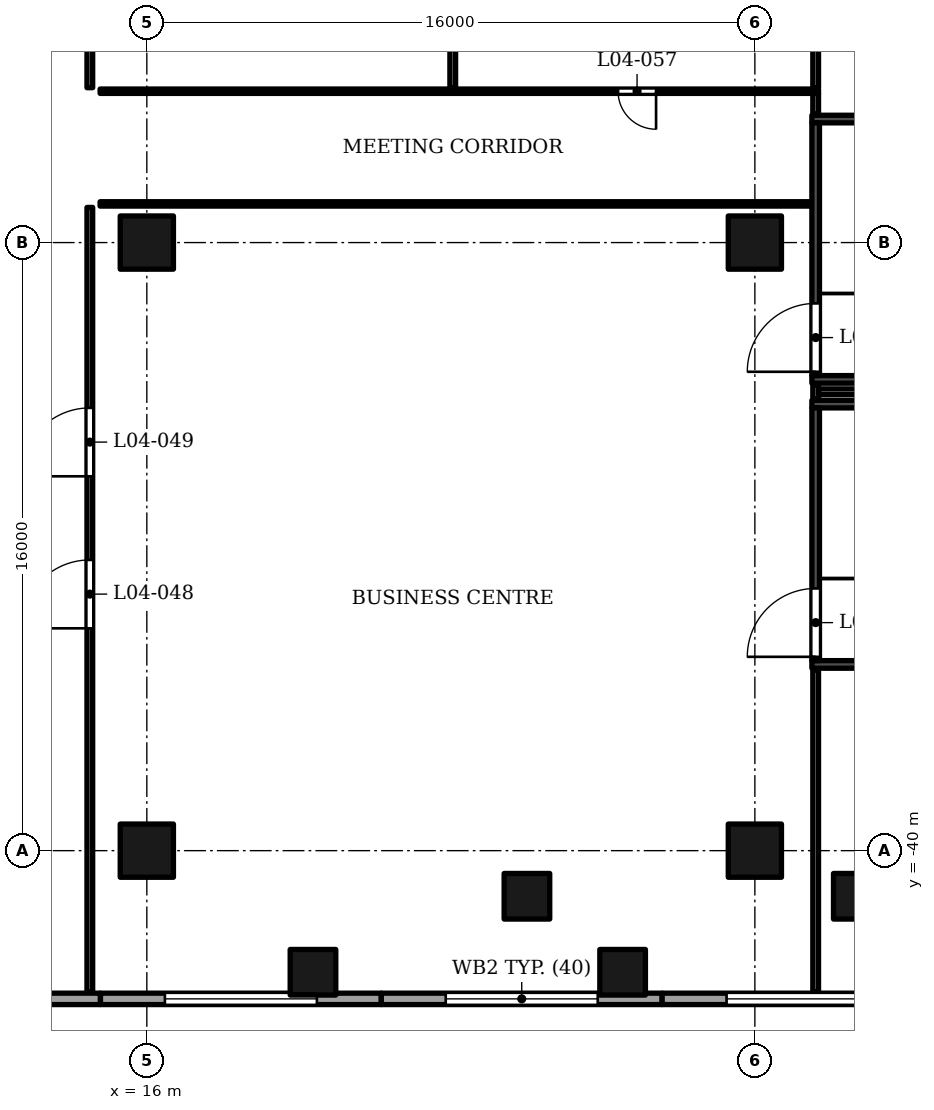
"""IFC4 building model, lengths in metres.
Left out: names, types, materials, properties, quantities, classifications, styles, units other than length and angle.
Written with IfcOpenShell. Run it as: python <this file> out.ifc"""

import sys

from ifc_helpers import new_model, si_unit, direction, frame, frame_2d, origin, origin_2d, place, context, subcontext, project, spatial, rectangle, extrude, element, fill, save


model = new_model("IFC4")
c1 = context("Model", 3, precision=1e-05, world=origin(), true_north=direction((0.0, 1.0)))
c2 = subcontext(c1, "Body", "Model", "MODEL_VIEW")
j1 = project(units=[si_unit("LENGTHUNIT", "METRE"), si_unit("PLANEANGLEUNIT", "RADIAN")], contexts=[c1])
p1 = place(None, origin())
s1 = spatial("IfcSite", under=j1, at=p1, CompositionType="ELEMENT")
p2 = place(p1, origin())
s2 = spatial("IfcBuilding", under=s1, at=p2, CompositionType="ELEMENT")
p3 = place(p2, frame((0.0, 0.0, 34.5)))
s3 = spatial("IfcBuildingStorey", under=s2, at=p3, CompositionType="ELEMENT", Elevation=34.5)
for number, where, z_axis, x_axis in (
    (1, (16.0, -40.0, 0.0), (0.0, 0.0, 1.0), (1.0, 0.0, 0.0)),
    (2, (16.0, -24.0, 0.0), (0.0, 0.0, 1.0), (1.0, 0.0, 0.0)),
    (3, (32.0, -40.0, 0.0), (0.0, 0.0, 1.0), (1.0, 0.0, 0.0)),
    (4, (32.0, -24.0, 0.0), (0.0, 0.0, 1.0), (1.0, 0.0, 0.0)),
):
    element("IfcColumn", number, at=place(p3, frame(where, z_axis=z_axis, x_axis=x_axis)), inside=s3, PredefinedType="COLUMN", context=c2, shape_type="SweptSolid", body=[
        extrude(rectangle(XDim=1.4, YDim=1.4, at=origin_2d()), origin(), (0.0, 0.0, 1.0), 5.5),
    ])
for number, where, z_axis, x_axis in (
    (5, (34.669, -41.2, 0.0), (0.0, 0.0, 1.0), (1.0, 0.0, 0.0)),
    (6, (26.002, -41.2, 0.0), (0.0, 0.0, 1.0), (1.0, 0.0, 0.0)),
    (7, (28.52, -43.2, 0.0), (0.0, 0.0, 1.0), (1.0, 0.0, 0.0)),
    (8, (20.372, -43.2, 0.0), (0.0, 0.0, 1.0), (1.0, 0.0, 0.0)),
):
    element("IfcColumn", number, at=place(p3, frame(where, z_axis=z_axis, x_axis=x_axis)), inside=s3, PredefinedType="COLUMN", context=c2, shape_type="SweptSolid", body=[
        extrude(rectangle(XDim=1.2, YDim=1.2, at=origin_2d()), origin(), (0.0, 0.0, 1.0), 5.5),
    ])
p4 = place(p3, frame((7.39, -43.9, 0.0), z_axis=(0.0, 0.0, 1.0), x_axis=(1.0, 0.0, 0.0)))
e9 = element("IfcWall", 9, at=p4, inside=s3, PredefinedType="SOLIDWALL", context=c2, shape_type="SweptSolid", body=[
    extrude(rectangle(XDim=7.39, YDim=0.3, at=frame_2d((3.695, 0.0))), origin(), (0.0, 0.0, 1.0), 4.1),
])
p5 = place(p4, frame((1.695, 0.0, 1.0)))
e10 = element("IfcOpeningElement", 10, at=p5, cuts=e9, PredefinedType="OPENING", context=c2, shape_type="SweptSolid", body=[
    extrude(rectangle(XDim=4.0, YDim=1.8, at=frame_2d((2.0, 0.9))), frame((0.0, 0.16, 0.0), z_axis=(0.0, -1.0, 0.0), x_axis=(1.0, 0.0, 0.0)), (0.0, 0.0, 1.0), 0.32),
])
p6 = place(p3, frame((14.78, -43.9, 0.0), z_axis=(0.0, 0.0, 1.0), x_axis=(1.0, 0.0, 0.0)))
e11 = element("IfcWall", 11, at=p6, inside=s3, PredefinedType="SOLIDWALL", context=c2, shape_type="SweptSolid", body=[
    extrude(rectangle(XDim=7.39, YDim=0.3, at=frame_2d((3.695, 0.0))), origin(), (0.0, 0.0, 1.0), 4.1),
])
p7 = place(p6, frame((1.695, 0.0, 1.0)))
e12 = element("IfcOpeningElement", 12, at=p7, cuts=e11, PredefinedType="OPENING", context=c2, shape_type="SweptSolid", body=[
    extrude(rectangle(XDim=4.0, YDim=1.8, at=frame_2d((2.0, 0.9))), frame((0.0, 0.16, 0.0), z_axis=(0.0, -1.0, 0.0), x_axis=(1.0, 0.0, 0.0)), (0.0, 0.0, 1.0), 0.32),
])
p8 = place(p3, frame((22.17, -43.9, 0.0), z_axis=(0.0, 0.0, 1.0), x_axis=(1.0, 0.0, 0.0)))
e13 = element("IfcWall", 13, at=p8, inside=s3, PredefinedType="SOLIDWALL", context=c2, shape_type="SweptSolid", body=[
    extrude(rectangle(XDim=7.39, YDim=0.3, at=frame_2d((3.695, 0.0))), origin(), (0.0, 0.0, 1.0), 4.1),
])
p9 = place(p8, frame((1.695, 0.0, 1.0)))
e14 = element("IfcOpeningElement", 14, at=p9, cuts=e13, PredefinedType="OPENING", context=c2, shape_type="SweptSolid", body=[
    extrude(rectangle(XDim=4.0, YDim=1.8, at=frame_2d((2.0, 0.9))), frame((0.0, 0.16, 0.0), z_axis=(0.0, -1.0, 0.0), x_axis=(1.0, 0.0, 0.0)), (0.0, 0.0, 1.0), 0.32),
])
p10 = place(p3, frame((29.56, -43.9, 0.0), z_axis=(0.0, 0.0, 1.0), x_axis=(1.0, 0.0, 0.0)))
e15 = element("IfcWall", 15, at=p10, inside=s3, PredefinedType="SOLIDWALL", context=c2, shape_type="SweptSolid", body=[
    extrude(rectangle(XDim=7.39, YDim=0.3, at=frame_2d((3.695, 0.0))), origin(), (0.0, 0.0, 1.0), 4.1),
])
p11 = place(p10, frame((1.695, 0.0, 1.0)))
e16 = element("IfcOpeningElement", 16, at=p11, cuts=e15, PredefinedType="OPENING", context=c2, shape_type="SweptSolid", body=[
    extrude(rectangle(XDim=4.0, YDim=1.8, at=frame_2d((2.0, 0.9))), frame((0.0, 0.16, 0.0), z_axis=(0.0, -1.0, 0.0), x_axis=(1.0, 0.0, 0.0)), (0.0, 0.0, 1.0), 0.32),
])
for number, where, z_axis, x_axis in (
    (17, (7.4, -43.85, 5.5), (0.0, 0.0, 1.0), (1.0, 0.0, 0.0)),
    (18, (22.2, -43.85, 5.5), (0.0, 0.0, 1.0), (1.0, 0.0, 0.0)),
):
    element("IfcWall", number, at=place(p3, frame(where, z_axis=z_axis, x_axis=x_axis)), inside=s3, PredefinedType="PARAPET", context=c2, shape_type="SweptSolid", body=[
        extrude(rectangle(XDim=14.8, YDim=0.3, at=frame_2d((7.4, 0.0))), origin(), (0.0, 0.0, 1.0), 1.1),
    ])
for number, where, z_axis, x_axis in (
    (19, (33.5, -35.1, 0.0), (0.0, 0.0, 1.0), (1.0, 0.0, 0.0)),
    (20, (33.5, -28.25, 0.0), (0.0, 0.0, 1.0), (1.0, 0.0, 0.0)),
):
    element("IfcWall", number, at=place(p3, frame(where, z_axis=z_axis, x_axis=x_axis)), inside=s3, PredefinedType="SOLIDWALL", context=c2, shape_type="SweptSolid", body=[
        extrude(rectangle(XDim=4.87, YDim=0.2, at=frame_2d((2.435, 0.0))), origin(), (0.0, 0.0, 1.0), 5.05),
    ])
p12 = place(p3, frame((33.6, -35.0, 0.0), z_axis=(0.0, 0.0, 1.0), x_axis=(0.0, 1.0, 0.0)))
e21 = element("IfcWall", 21, at=p12, inside=s3, PredefinedType="SOLIDWALL", context=c2, shape_type="SweptSolid", body=[
    extrude(rectangle(XDim=6.65, YDim=0.2, at=frame_2d((3.325, 0.0))), origin(), (0.0, 0.0, 1.0), 5.05),
])
p13 = place(p12, frame((0.1, 0.0, 0.0)))
e22 = element("IfcOpeningElement", 22, at=p13, cuts=e21, PredefinedType="OPENING", context=c2, shape_type="SweptSolid", body=[
    extrude(rectangle(XDim=1.8, YDim=2.4, at=frame_2d((0.9, 1.2))), frame((0.0, 0.11, 0.0), z_axis=(0.0, -1.0, 0.0), x_axis=(1.0, 0.0, 0.0)), (0.0, 0.0, 1.0), 0.22),
])
for number, where, z_axis, x_axis in (
    (23, (33.5, -27.6, 0.0), (0.0, 0.0, 1.0), (1.0, 0.0, 0.0)),
    (24, (33.5, -20.75, 0.0), (0.0, 0.0, 1.0), (1.0, 0.0, 0.0)),
):
    element("IfcWall", number, at=place(p3, frame(where, z_axis=z_axis, x_axis=x_axis)), inside=s3, PredefinedType="SOLIDWALL", context=c2, shape_type="SweptSolid", body=[
        extrude(rectangle(XDim=4.87, YDim=0.2, at=frame_2d((2.435, 0.0))), origin(), (0.0, 0.0, 1.0), 5.05),
    ])
p14 = place(p3, frame((33.6, -27.5, 0.0), z_axis=(0.0, 0.0, 1.0), x_axis=(0.0, 1.0, 0.0)))
e25 = element("IfcWall", 25, at=p14, inside=s3, PredefinedType="SOLIDWALL", context=c2, shape_type="SweptSolid", body=[
    extrude(rectangle(XDim=6.65, YDim=0.2, at=frame_2d((3.325, 0.0))), origin(), (0.0, 0.0, 1.0), 5.05),
])
p15 = place(p14, frame((0.1, 0.0, 0.0)))
e26 = element("IfcOpeningElement", 26, at=p15, cuts=e25, PredefinedType="OPENING", context=c2, shape_type="SweptSolid", body=[
    extrude(rectangle(XDim=1.8, YDim=2.4, at=frame_2d((0.9, 1.2))), frame((0.0, 0.11, 0.0), z_axis=(0.0, -1.0, 0.0), x_axis=(1.0, 0.0, 0.0)), (0.0, 0.0, 1.0), 0.22),
])
p16 = place(p3, frame((14.5, -43.72, 0.0), z_axis=(0.0, 0.0, 1.0), x_axis=(0.0, 1.0, 0.0)))
e27 = element("IfcWall", 27, at=p16, inside=s3, PredefinedType="PARTITIONING", context=c2, shape_type="SweptSolid", body=[
    extrude(rectangle(XDim=20.645, YDim=0.15, at=frame_2d((10.323, 0.0))), origin(), (0.0, 0.0, 1.0), 3.85),
])
p17 = place(p16, frame((9.57, 0.0, 0.0)))
e28 = element("IfcOpeningElement", 28, at=p17, cuts=e27, PredefinedType="OPENING", context=c2, shape_type="SweptSolid", body=[
    extrude(rectangle(XDim=1.8, YDim=2.1, at=frame_2d((0.9, 1.05))), frame((0.0, 0.085, 0.0), z_axis=(0.0, -1.0, 0.0), x_axis=(1.0, 0.0, 0.0)), (0.0, 0.0, 1.0), 0.17),
])
p18 = place(p16, frame((13.57, 0.0, 0.0)))
e29 = element("IfcOpeningElement", 29, at=p18, cuts=e27, PredefinedType="OPENING", context=c2, shape_type="SweptSolid", body=[
    extrude(rectangle(XDim=1.8, YDim=2.1, at=frame_2d((0.9, 1.05))), frame((0.0, 0.085, 0.0), z_axis=(0.0, -1.0, 0.0), x_axis=(1.0, 0.0, 0.0)), (0.0, 0.0, 1.0), 0.17),
])
p19 = place(p3, frame((33.6, -43.72, 0.0), z_axis=(0.0, 0.0, 1.0), x_axis=(0.0, 1.0, 0.0)))
e30 = element("IfcWall", 30, at=p19, inside=s3, PredefinedType="PARTITIONING", context=c2, shape_type="SweptSolid", body=[
    extrude(rectangle(XDim=8.48, YDim=0.15, at=frame_2d((4.24, 0.0))), origin(), (0.0, 0.0, 1.0), 3.85),
])
p20 = place(p3, frame((33.6, -28.11, 0.0), z_axis=(0.0, 0.0, 1.0), x_axis=(0.0, 1.0, 0.0)))
e31 = element("IfcWall", 31, at=p20, inside=s3, PredefinedType="PARTITIONING", context=c2, shape_type="SweptSolid", body=[
    extrude(rectangle(XDim=0.37, YDim=0.15, at=frame_2d((0.185, 0.0))), origin(), (0.0, 0.0, 1.0), 5.05),
])
p21 = place(p3, frame((33.675, -27.925, 0.0), z_axis=(0.0, 0.0, 1.0), x_axis=(1.0, 0.0, 0.0)))
e32 = element("IfcWall", 32, at=p21, inside=s3, PredefinedType="PARTITIONING", context=c2, shape_type="SweptSolid", body=[
    extrude(rectangle(XDim=8.045, YDim=0.15, at=frame_2d((4.022, 0.0))), origin(), (0.0, 0.0, 1.0), 4.15),
])
p22 = place(p3, frame((14.77, -22.982, 0.0), z_axis=(0.0, 0.0, 1.0), x_axis=(1.0, 0.0, 0.0)))
e33 = element("IfcWall", 33, at=p22, inside=s3, PredefinedType="PARTITIONING", context=c2, shape_type="SweptSolid", body=[
    extrude(rectangle(XDim=18.69, YDim=0.115, at=frame_2d((9.345, 0.0))), origin(), (0.0, 0.0, 1.0), 3.85),
])
p23 = place(p3, frame((33.6, -20.61, 0.0), z_axis=(0.0, 0.0, 1.0), x_axis=(0.0, 1.0, 0.0)))
e34 = element("IfcWall", 34, at=p23, inside=s3, PredefinedType="PARTITIONING", context=c2, shape_type="SweptSolid", body=[
    extrude(rectangle(XDim=0.535, YDim=0.15, at=frame_2d((0.268, 0.0))), origin(), (0.0, 0.0, 1.0), 5.05),
])
p24 = place(p3, frame((14.77, -20.018, 0.0), z_axis=(0.0, 0.0, 1.0), x_axis=(1.0, 0.0, 0.0)))
e35 = element("IfcWall", 35, at=p24, inside=s3, PredefinedType="PARTITIONING", context=c2, shape_type="SweptSolid", body=[
    extrude(rectangle(XDim=18.905, YDim=0.115, at=frame_2d((9.453, 0.0))), origin(), (0.0, 0.0, 1.0), 3.85),
])
p25 = place(p24, frame((13.63, 0.0, 0.0)))
e36 = element("IfcOpeningElement", 36, at=p25, cuts=e35, PredefinedType="OPENING", context=c2, shape_type="SweptSolid", body=[
    extrude(rectangle(XDim=1.0, YDim=2.1, at=frame_2d((0.5, 1.05))), frame((0.0, 0.067, 0.0), z_axis=(0.0, -1.0, 0.0), x_axis=(1.0, 0.0, 0.0)), (0.0, 0.0, 1.0), 0.135),
])
p26 = place(p3, frame((14.5, -19.925, 0.0), z_axis=(0.0, 0.0, 1.0), x_axis=(0.0, 1.0, 0.0)))
e37 = element("IfcWall", 37, at=p26, inside=s3, PredefinedType="PARTITIONING", context=c2, shape_type="SweptSolid", body=[
    extrude(rectangle(XDim=17.85, YDim=0.15, at=frame_2d((8.925, 0.0))), origin(), (0.0, 0.0, 1.0), 3.85),
])
p27 = place(p26, frame((8.325, 0.0, 0.0)))
e38 = element("IfcOpeningElement", 38, at=p27, cuts=e37, PredefinedType="OPENING", context=c2, shape_type="SweptSolid", body=[
    extrude(rectangle(XDim=1.0, YDim=2.1, at=frame_2d((0.5, 1.05))), frame((0.0, 0.085, 0.0), z_axis=(0.0, -1.0, 0.0), x_axis=(1.0, 0.0, 0.0)), (0.0, 0.0, 1.0), 0.17),
])
p28 = place(p3, frame((24.05, -19.925, 0.0), z_axis=(0.0, 0.0, 1.0), x_axis=(0.0, 1.0, 0.0)))
e39 = element("IfcWall", 39, at=p28, inside=s3, PredefinedType="PARTITIONING", context=c2, shape_type="SweptSolid", body=[
    extrude(rectangle(XDim=17.85, YDim=0.15, at=frame_2d((8.925, 0.0))), origin(), (0.0, 0.0, 1.0), 3.85),
])
p29 = place(p3, frame((33.6, -19.925, 0.0), z_axis=(0.0, 0.0, 1.0), x_axis=(0.0, 1.0, 0.0)))
e40 = element("IfcWall", 40, at=p29, inside=s3, PredefinedType="PARTITIONING", context=c2, shape_type="SweptSolid", body=[
    extrude(rectangle(XDim=3.725, YDim=0.15, at=frame_2d((1.863, 0.0))), origin(), (0.0, 0.0, 1.0), 5.05),
])
p30 = place(p7, origin())
e41 = element("IfcWindow", 41, at=p30, inside=s3, PartitioningType="SINGLE_PANEL", PredefinedType="WINDOW", context=c2, shape_type="SweptSolid", body=[
    extrude(rectangle(XDim=4.0, YDim=1.8, at=frame_2d((2.0, 0.9))), frame((0.0, 0.03, 0.0), z_axis=(0.0, -1.0, 0.0), x_axis=(1.0, 0.0, 0.0)), (0.0, 0.0, 1.0), 0.06),
])
fill(e12, e41)
p31 = place(p9, origin())
e42 = element("IfcWindow", 42, at=p31, inside=s3, PartitioningType="SINGLE_PANEL", PredefinedType="WINDOW", context=c2, shape_type="SweptSolid", body=[
    extrude(rectangle(XDim=4.0, YDim=1.8, at=frame_2d((2.0, 0.9))), frame((0.0, 0.03, 0.0), z_axis=(0.0, -1.0, 0.0), x_axis=(1.0, 0.0, 0.0)), (0.0, 0.0, 1.0), 0.06),
])
fill(e14, e42)
p32 = place(p11, origin())
e43 = element("IfcWindow", 43, at=p32, inside=s3, PartitioningType="SINGLE_PANEL", PredefinedType="WINDOW", context=c2, shape_type="SweptSolid", body=[
    extrude(rectangle(XDim=4.0, YDim=1.8, at=frame_2d((2.0, 0.9))), frame((0.0, 0.03, 0.0), z_axis=(0.0, -1.0, 0.0), x_axis=(1.0, 0.0, 0.0)), (0.0, 0.0, 1.0), 0.06),
])
fill(e16, e43)
p33 = place(p13, origin())
e44 = element("IfcDoor", 44, at=p33, inside=s3, OperationType="DOUBLE_DOOR_SINGLE_SWING", PredefinedType="DOOR", context=c2, shape_type="SweptSolid", body=[
    extrude(rectangle(XDim=1.8, YDim=2.4, at=frame_2d((0.9, 1.2))), frame((0.0, 0.025, 0.0), z_axis=(0.0, -1.0, 0.0), x_axis=(1.0, 0.0, 0.0)), (0.0, 0.0, 1.0), 0.05),
])
fill(e22, e44)
p34 = place(p15, origin())
e45 = element("IfcDoor", 45, at=p34, inside=s3, OperationType="DOUBLE_DOOR_SINGLE_SWING", PredefinedType="DOOR", context=c2, shape_type="SweptSolid", body=[
    extrude(rectangle(XDim=1.8, YDim=2.4, at=frame_2d((0.9, 1.2))), frame((0.0, 0.025, 0.0), z_axis=(0.0, -1.0, 0.0), x_axis=(1.0, 0.0, 0.0)), (0.0, 0.0, 1.0), 0.05),
])
fill(e26, e45)
p35 = place(p17, origin())
e46 = element("IfcDoor", 46, at=p35, inside=s3, OperationType="DOUBLE_DOOR_SINGLE_SWING", PredefinedType="DOOR", context=c2, shape_type="SweptSolid", body=[
    extrude(rectangle(XDim=1.8, YDim=2.1, at=frame_2d((0.9, 1.05))), frame((0.0, 0.025, 0.0), z_axis=(0.0, -1.0, 0.0), x_axis=(1.0, 0.0, 0.0)), (0.0, 0.0, 1.0), 0.05),
])
fill(e28, e46)
p36 = place(p18, origin())
e47 = element("IfcDoor", 47, at=p36, inside=s3, OperationType="DOUBLE_DOOR_SINGLE_SWING", PredefinedType="DOOR", context=c2, shape_type="SweptSolid", body=[
    extrude(rectangle(XDim=1.8, YDim=2.1, at=frame_2d((0.9, 1.05))), frame((0.0, 0.025, 0.0), z_axis=(0.0, -1.0, 0.0), x_axis=(1.0, 0.0, 0.0)), (0.0, 0.0, 1.0), 0.05),
])
fill(e29, e47)
p37 = place(p25, origin())
e48 = element("IfcDoor", 48, at=p37, inside=s3, OperationType="SINGLE_SWING_RIGHT", PredefinedType="DOOR", context=c2, shape_type="SweptSolid", body=[
    extrude(rectangle(XDim=1.0, YDim=2.1, at=frame_2d((0.5, 1.05))), frame((0.0, 0.025, 0.0), z_axis=(0.0, -1.0, 0.0), x_axis=(1.0, 0.0, 0.0)), (0.0, 0.0, 1.0), 0.05),
])
fill(e36, e48)
save(model, sys.argv[1])
